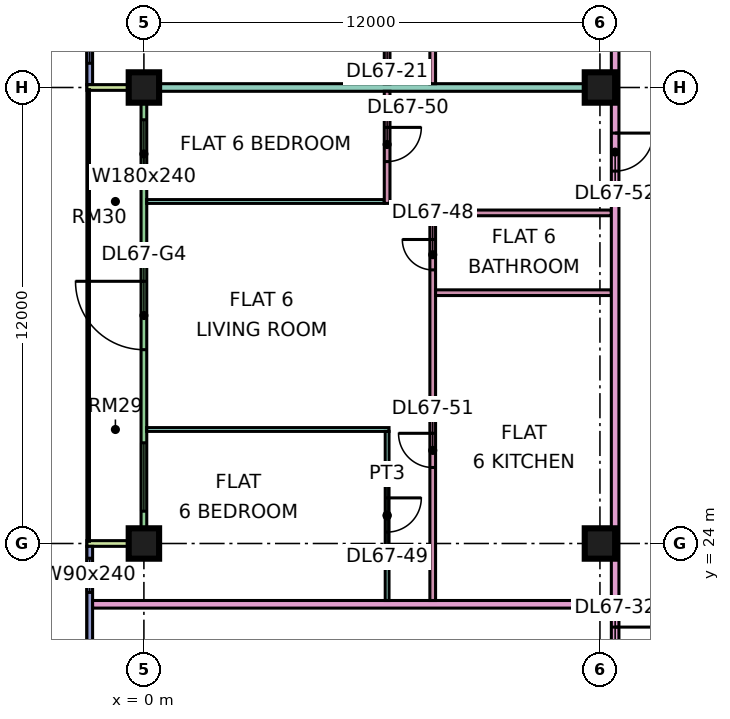
"""IFC4 building model, lengths in metres.
Left out: names, types, materials, properties, quantities, classifications, styles, units other than length and angle.
Written with IfcOpenShell. Run it as: python <this file> out.ifc"""

import sys

from ifc_helpers import new_model, si_unit, direction, frame, frame_2d, origin, origin_2d, place, context, subcontext, project, spatial, rectangle, extrude, element, fill, save


model = new_model("IFC4")
c1 = context("Model", 3, precision=1e-05, world=origin(), true_north=direction((0.0, 1.0)))
c2 = subcontext(c1, "Body", "Model", "MODEL_VIEW")
j1 = project(units=[si_unit("LENGTHUNIT", "METRE"), si_unit("PLANEANGLEUNIT", "RADIAN")], contexts=[c1])
p1 = place(None, origin())
s1 = spatial("IfcSite", under=j1, at=p1, CompositionType="ELEMENT")
p2 = place(p1, origin())
s2 = spatial("IfcBuilding", under=s1, at=p2, CompositionType="ELEMENT")
p3 = place(p2, frame((0.0, 0.0, 288.4)))
s3 = spatial("IfcBuildingStorey", under=s2, at=p3, CompositionType="ELEMENT", Elevation=288.4)
p4 = place(p3, frame((0.0, 24.0, 0.0), z_axis=(0.0, 0.0, 1.0), x_axis=(1.0, 0.0, 0.0)))
e1 = element("IfcColumn", 1, at=p4, inside=s3, PredefinedType="COLUMN", context=c2, shape_type="SweptSolid", body=[
    extrude(rectangle(XDim=0.8, YDim=0.8, at=origin_2d()), origin(), (0.0, 0.0, 1.0), 3.75),
])
p5 = place(p3, frame((0.0, 36.0, 0.0), z_axis=(0.0, 0.0, 1.0), x_axis=(1.0, 0.0, 0.0)))
e2 = element("IfcColumn", 2, at=p5, inside=s3, PredefinedType="COLUMN", context=c2, shape_type="SweptSolid", body=[
    extrude(rectangle(XDim=0.8, YDim=0.8, at=origin_2d()), origin(), (0.0, 0.0, 1.0), 3.75),
])
for number, where, z_axis, x_axis in (
    (3, (12.0, 24.0, 0.0), (0.0, 0.0, 1.0), (1.0, 0.0, 0.0)),
    (4, (12.0, 36.0, 0.0), (0.0, 0.0, 1.0), (1.0, 0.0, 0.0)),
):
    element("IfcColumn", number, at=place(p3, frame(where, z_axis=z_axis, x_axis=x_axis)), inside=s3, PredefinedType="COLUMN", context=c2, shape_type="SweptSolid", body=[
        extrude(rectangle(XDim=0.8, YDim=0.8, at=origin_2d()), origin(), (0.0, 0.0, 1.0), 3.75),
    ])
p6 = place(p3, frame((-1.425, 47.925, 0.0), z_axis=(0.0, 0.0, 1.0), x_axis=(0.0, -1.0, 0.0)))
e5 = element("IfcWall", 5, at=p6, inside=s3, PredefinedType="SOLIDWALL", context=c2, shape_type="SweptSolid", body=[
    extrude(rectangle(XDim=11.85, YDim=0.15, at=frame_2d((5.925, 0.0))), origin(), (0.0, 0.0, 1.0), 3.35),
])
p7 = place(p6, frame((1.462, 0.0, 0.45)))
e6 = element("IfcOpeningElement", 6, at=p7, cuts=e5, PredefinedType="OPENING", context=c2, shape_type="SweptSolid", body=[
    extrude(rectangle(XDim=3.0, YDim=2.4, at=frame_2d((1.5, 1.2))), frame((0.0, 0.085, 0.0), z_axis=(0.0, -1.0, 0.0), x_axis=(1.0, 0.0, 0.0)), (0.0, 0.0, 1.0), 0.17),
])
p8 = place(p6, frame((6.525, 0.0, 0.45)))
e7 = element("IfcOpeningElement", 7, at=p8, cuts=e5, PredefinedType="OPENING", context=c2, shape_type="SweptSolid", body=[
    extrude(rectangle(XDim=1.8, YDim=2.4, at=frame_2d((0.9, 1.2))), frame((0.0, 0.085, 0.0), z_axis=(0.0, -1.0, 0.0), x_axis=(1.0, 0.0, 0.0)), (0.0, 0.0, 1.0), 0.17),
])
p9 = place(p6, frame((9.488, 0.0, 0.45)))
e8 = element("IfcOpeningElement", 8, at=p9, cuts=e5, PredefinedType="OPENING", context=c2, shape_type="SweptSolid", body=[
    extrude(rectangle(XDim=1.8, YDim=2.4, at=frame_2d((0.9, 1.2))), frame((0.0, 0.085, 0.0), z_axis=(0.0, -1.0, 0.0), x_axis=(1.0, 0.0, 0.0)), (0.0, 0.0, 1.0), 0.17),
])
p10 = place(p3, frame((0.0, 35.925, 0.0), z_axis=(0.0, 0.0, 1.0), x_axis=(0.0, -1.0, 0.0)))
e9 = element("IfcWall", 9, at=p10, inside=s3, PredefinedType="SOLIDWALL", context=c2, shape_type="SweptSolid", body=[
    extrude(rectangle(XDim=11.85, YDim=0.15, at=frame_2d((5.925, 0.0))), origin(), (0.0, 0.0, 1.0), 3.35),
])
p11 = place(p10, frame((0.775, 0.0, 0.45)))
e10 = element("IfcOpeningElement", 10, at=p11, cuts=e9, PredefinedType="OPENING", context=c2, shape_type="SweptSolid", body=[
    extrude(rectangle(XDim=1.8, YDim=2.4, at=frame_2d((0.9, 1.2))), frame((0.0, 0.085, 0.0), z_axis=(0.0, -1.0, 0.0), x_axis=(1.0, 0.0, 0.0)), (0.0, 0.0, 1.0), 0.17),
])
p12 = place(p10, frame((5.025, 0.0, 0.0)))
e11 = element("IfcOpeningElement", 11, at=p12, cuts=e9, PredefinedType="OPENING", context=c2, shape_type="SweptSolid", body=[
    extrude(rectangle(XDim=1.8, YDim=2.4, at=frame_2d((0.9, 1.2))), frame((0.0, 0.085, 0.0), z_axis=(0.0, -1.0, 0.0), x_axis=(1.0, 0.0, 0.0)), (0.0, 0.0, 1.0), 0.17),
])
p13 = place(p10, frame((9.275, 0.0, 0.45)))
e12 = element("IfcOpeningElement", 12, at=p13, cuts=e9, PredefinedType="OPENING", context=c2, shape_type="SweptSolid", body=[
    extrude(rectangle(XDim=1.8, YDim=2.4, at=frame_2d((0.9, 1.2))), frame((0.0, 0.085, 0.0), z_axis=(0.0, -1.0, 0.0), x_axis=(1.0, 0.0, 0.0)), (0.0, 0.0, 1.0), 0.17),
])
for number, where, z_axis, x_axis in (
    (13, (-1.5, 36.0, 0.0), (0.0, 0.0, 1.0), (1.0, 0.0, 0.0)),
    (14, (-1.5, 24.0, 0.0), (0.0, 0.0, 1.0), (1.0, 0.0, 0.0)),
):
    element("IfcWall", number, at=place(p3, frame(where, z_axis=z_axis, x_axis=x_axis)), inside=s3, PredefinedType="SOLIDWALL", context=c2, shape_type="SweptSolid", body=[
        extrude(rectangle(XDim=1.5, YDim=0.15, at=frame_2d((0.75, 0.0))), origin(), (0.0, 0.0, 1.0), 3.35),
    ])
p14 = place(p3, frame((-1.425, 23.925, 0.0), z_axis=(0.0, 0.0, 1.0), x_axis=(0.0, -1.0, 0.0)))
e15 = element("IfcWall", 15, at=p14, inside=s3, PredefinedType="SOLIDWALL", context=c2, shape_type="SweptSolid", body=[
    extrude(rectangle(XDim=11.425, YDim=0.15, at=frame_2d((5.712, 0.0))), origin(), (0.0, 0.0, 1.0), 3.35),
])
p15 = place(p14, frame((0.312, 0.0, 0.45)))
e16 = element("IfcOpeningElement", 16, at=p15, cuts=e15, PredefinedType="OPENING", context=c2, shape_type="SweptSolid", body=[
    extrude(rectangle(XDim=0.9, YDim=2.4, at=frame_2d((0.45, 1.2))), frame((0.0, 0.085, 0.0), z_axis=(0.0, -1.0, 0.0), x_axis=(1.0, 0.0, 0.0)), (0.0, 0.0, 1.0), 0.17),
])
p16 = place(p14, frame((6.175, 0.0, 0.45)))
e17 = element("IfcOpeningElement", 17, at=p16, cuts=e15, PredefinedType="OPENING", context=c2, shape_type="SweptSolid", body=[
    extrude(rectangle(XDim=3.0, YDim=2.4, at=frame_2d((1.5, 1.2))), frame((0.0, 0.085, 0.0), z_axis=(0.0, -1.0, 0.0), x_axis=(1.0, 0.0, 0.0)), (0.0, 0.0, 1.0), 0.17),
])
p17 = place(p3, frame((-1.35, 22.4, 0.0), z_axis=(0.0, 0.0, 1.0), x_axis=(1.0, 0.0, 0.0)))
e18 = element("IfcWall", 18, at=p17, inside=s3, PredefinedType="PARTITIONING", context=c2, shape_type="SweptSolid", body=[
    extrude(rectangle(XDim=13.65, YDim=0.2, at=frame_2d((6.825, 0.0))), origin(), (0.0, 0.0, 1.0), 3.35),
])
e19 = element("IfcWall", 19, at=p5, inside=s3, PredefinedType="PARTITIONING", context=c2, shape_type="SweptSolid", body=[
    extrude(rectangle(XDim=12.3, YDim=0.2, at=frame_2d((6.15, 0.0))), origin(), (0.0, 0.0, 1.0), 3.35),
])
p18 = place(p3, frame((0.074, 27.0, 0.0), z_axis=(0.0, 0.0, 1.0), x_axis=(1.0, 0.0, 0.0)))
e20 = element("IfcWall", 20, at=p18, inside=s3, PredefinedType="PARTITIONING", context=c2, shape_type="SweptSolid", body=[
    extrude(rectangle(XDim=6.376, YDim=0.1, at=frame_2d((3.188, 0.0))), origin(), (0.0, 0.0, 1.0), 3.35),
])
p19 = place(p3, frame((0.074, 33.0, 0.0), z_axis=(0.0, 0.0, 1.0), x_axis=(1.0, 0.0, 0.0)))
e21 = element("IfcWall", 21, at=p19, inside=s3, PredefinedType="PARTITIONING", context=c2, shape_type="SweptSolid", body=[
    extrude(rectangle(XDim=6.251, YDim=0.1, at=frame_2d((3.125, 0.0))), origin(), (0.0, 0.0, 1.0), 3.35),
])
p20 = place(p3, frame((6.4, 22.5, 0.0), z_axis=(0.0, 0.0, 1.0), x_axis=(0.0, 1.0, 0.0)))
e22 = element("IfcWall", 22, at=p20, inside=s3, PredefinedType="PARTITIONING", context=c2, shape_type="SweptSolid", body=[
    extrude(rectangle(XDim=4.45, YDim=0.1, at=frame_2d((2.225, 0.0))), origin(), (0.0, 0.0, 1.0), 3.35),
])
p21 = place(p20, frame((1.8, 0.0, 0.0)))
e23 = element("IfcOpeningElement", 23, at=p21, cuts=e22, PredefinedType="OPENING", context=c2, shape_type="SweptSolid", body=[
    extrude(rectangle(XDim=0.9, YDim=2.1, at=frame_2d((0.45, 1.05))), frame((0.0, 0.06, 0.0), z_axis=(0.0, -1.0, 0.0), x_axis=(1.0, 0.0, 0.0)), (0.0, 0.0, 1.0), 0.12),
])
p22 = place(p3, frame((6.4, 32.95, 0.0), z_axis=(0.0, 0.0, 1.0), x_axis=(0.0, 1.0, 0.0)))
e24 = element("IfcWall", 24, at=p22, inside=s3, PredefinedType="PARTITIONING", context=c2, shape_type="SweptSolid", body=[
    extrude(rectangle(XDim=2.95, YDim=0.15, at=frame_2d((1.475, 0.0))), origin(), (0.0, 0.0, 1.0), 3.35),
])
p23 = place(p22, frame((1.1, 0.0, 0.0)))
e25 = element("IfcOpeningElement", 25, at=p23, cuts=e24, PredefinedType="OPENING", context=c2, shape_type="SweptSolid", body=[
    extrude(rectangle(XDim=0.9, YDim=2.1, at=frame_2d((0.45, 1.05))), frame((0.0, 0.085, 0.0), z_axis=(0.0, -1.0, 0.0), x_axis=(1.0, 0.0, 0.0)), (0.0, 0.0, 1.0), 0.17),
])
p24 = place(p3, frame((6.4, 36.1, 0.0), z_axis=(0.0, 0.0, 1.0), x_axis=(0.0, 1.0, 0.0)))
e26 = element("IfcWall", 26, at=p24, inside=s3, PredefinedType="PARTITIONING", context=c2, shape_type="SweptSolid", body=[
    extrude(rectangle(XDim=11.95, YDim=0.15, at=frame_2d((5.975, 0.0))), origin(), (0.0, 0.0, 1.0), 3.35),
])
p25 = place(p24, frame((0.95, 0.0, 0.0)))
e27 = element("IfcOpeningElement", 27, at=p25, cuts=e26, PredefinedType="OPENING", context=c2, shape_type="SweptSolid", body=[
    extrude(rectangle(XDim=0.9, YDim=2.1, at=frame_2d((0.45, 1.05))), frame((0.0, 0.085, 0.0), z_axis=(0.0, -1.0, 0.0), x_axis=(1.0, 0.0, 0.0)), (0.0, 0.0, 1.0), 0.17),
])
p26 = place(p24, frame((4.8, 0.0, 0.0)))
e28 = element("IfcOpeningElement", 28, at=p26, cuts=e26, PredefinedType="OPENING", context=c2, shape_type="SweptSolid", body=[
    extrude(rectangle(XDim=0.8, YDim=2.1, at=frame_2d((0.4, 1.05))), frame((0.0, 0.085, 0.0), z_axis=(0.0, -1.0, 0.0), x_axis=(1.0, 0.0, 0.0)), (0.0, 0.0, 1.0), 0.17),
])
p27 = place(p3, frame((7.6, 22.5, 0.0), z_axis=(0.0, 0.0, 1.0), x_axis=(0.0, 1.0, 0.0)))
e29 = element("IfcWall", 29, at=p27, inside=s3, PredefinedType="PARTITIONING", context=c2, shape_type="SweptSolid", body=[
    extrude(rectangle(XDim=10.275, YDim=0.15, at=frame_2d((5.137, 0.0))), origin(), (0.0, 0.0, 1.0), 3.35),
])
p28 = place(p27, frame((8.7, 0.0, 0.0)))
e30 = element("IfcOpeningElement", 30, at=p28, cuts=e29, PredefinedType="OPENING", context=c2, shape_type="SweptSolid", body=[
    extrude(rectangle(XDim=0.8, YDim=2.1, at=frame_2d((0.4, 1.05))), frame((0.0, 0.085, 0.0), z_axis=(0.0, -1.0, 0.0), x_axis=(1.0, 0.0, 0.0)), (0.0, 0.0, 1.0), 0.17),
])
p29 = place(p27, frame((3.5, 0.0, 0.0)))
e31 = element("IfcOpeningElement", 31, at=p29, cuts=e29, PredefinedType="OPENING", context=c2, shape_type="SweptSolid", body=[
    extrude(rectangle(XDim=0.9, YDim=2.1, at=frame_2d((0.45, 1.05))), frame((0.0, 0.085, 0.0), z_axis=(0.0, -1.0, 0.0), x_axis=(1.0, 0.0, 0.0)), (0.0, 0.0, 1.0), 0.17),
])
p30 = place(p3, frame((7.6, 36.1, 0.0), z_axis=(0.0, 0.0, 1.0), x_axis=(0.0, 1.0, 0.0)))
e32 = element("IfcWall", 32, at=p30, inside=s3, PredefinedType="PARTITIONING", context=c2, shape_type="SweptSolid", body=[
    extrude(rectangle(XDim=14.975, YDim=0.15, at=frame_2d((7.487, 0.0))), origin(), (0.0, 0.0, 1.0), 3.35),
])
p31 = place(p30, frame((9.5, 0.0, 0.0)))
e33 = element("IfcOpeningElement", 33, at=p31, cuts=e32, PredefinedType="OPENING", context=c2, shape_type="SweptSolid", body=[
    extrude(rectangle(XDim=0.8, YDim=2.1, at=frame_2d((0.4, 1.05))), frame((0.0, 0.085, 0.0), z_axis=(0.0, -1.0, 0.0), x_axis=(1.0, 0.0, 0.0)), (0.0, 0.0, 1.0), 0.17),
])
p32 = place(p30, frame((2.75, 0.0, 0.0)))
e34 = element("IfcOpeningElement", 34, at=p32, cuts=e32, PredefinedType="OPENING", context=c2, shape_type="SweptSolid", body=[
    extrude(rectangle(XDim=0.9, YDim=2.1, at=frame_2d((0.45, 1.05))), frame((0.0, 0.085, 0.0), z_axis=(0.0, -1.0, 0.0), x_axis=(1.0, 0.0, 0.0)), (0.0, 0.0, 1.0), 0.17),
])
p33 = place(p30, frame((7.1, 0.0, 0.0)))
e35 = element("IfcOpeningElement", 35, at=p33, cuts=e32, PredefinedType="OPENING", context=c2, shape_type="SweptSolid", body=[
    extrude(rectangle(XDim=0.9, YDim=2.1, at=frame_2d((0.45, 1.05))), frame((0.0, 0.085, 0.0), z_axis=(0.0, -1.0, 0.0), x_axis=(1.0, 0.0, 0.0)), (0.0, 0.0, 1.0), 0.17),
])
for number, where, z_axis, x_axis in (
    (36, (7.675, 30.6, 0.0), (0.0, 0.0, 1.0), (1.0, 0.0, 0.0)),
    (37, (7.675, 32.7, 0.0), (0.0, 0.0, 1.0), (1.0, 0.0, 0.0)),
):
    element("IfcWall", number, at=place(p3, frame(where, z_axis=z_axis, x_axis=x_axis)), inside=s3, PredefinedType="PARTITIONING", context=c2, shape_type="SweptSolid", body=[
        extrude(rectangle(XDim=4.625, YDim=0.15, at=frame_2d((2.312, 0.0))), origin(), (0.0, 0.0, 1.0), 3.35),
    ])
p34 = place(p3, frame((12.4, 20.0, 0.0), z_axis=(0.0, 0.0, 1.0), x_axis=(0.0, 1.0, 0.0)))
e38 = element("IfcWall", 38, at=p34, inside=s3, PredefinedType="PARTITIONING", context=c2, shape_type="SweptSolid", body=[
    extrude(rectangle(XDim=34.0, YDim=0.2, at=frame_2d((17.0, 0.0))), origin(), (0.0, 0.0, 1.0), 3.35),
])
p35 = place(p34, frame((31.95, 0.0, 0.0)))
e39 = element("IfcOpeningElement", 39, at=p35, cuts=e38, PredefinedType="OPENING", context=c2, shape_type="SweptSolid", body=[
    extrude(rectangle(XDim=1.0, YDim=2.1, at=frame_2d((0.5, 1.05))), frame((0.0, 0.11, 0.0), z_axis=(0.0, -1.0, 0.0), x_axis=(1.0, 0.0, 0.0)), (0.0, 0.0, 1.0), 0.22),
])
p36 = place(p34, frame((0.6, 0.0, 0.0)))
e40 = element("IfcOpeningElement", 40, at=p36, cuts=e38, PredefinedType="OPENING", context=c2, shape_type="SweptSolid", body=[
    extrude(rectangle(XDim=1.2, YDim=2.1, at=frame_2d((0.6, 1.05))), frame((0.0, 0.11, 0.0), z_axis=(0.0, -1.0, 0.0), x_axis=(1.0, 0.0, 0.0)), (0.0, 0.0, 1.0), 0.22),
])
p37 = place(p34, frame((13.8, 0.0, 0.0)))
e41 = element("IfcOpeningElement", 41, at=p37, cuts=e38, PredefinedType="OPENING", context=c2, shape_type="SweptSolid", body=[
    extrude(rectangle(XDim=1.0, YDim=2.1, at=frame_2d((0.5, 1.05))), frame((0.0, 0.11, 0.0), z_axis=(0.0, -1.0, 0.0), x_axis=(1.0, 0.0, 0.0)), (0.0, 0.0, 1.0), 0.22),
])
p38 = place(p9, origin())
e42 = element("IfcWindow", 42, at=p38, inside=s3, PartitioningType="SINGLE_PANEL", PredefinedType="WINDOW", context=c2, shape_type="SweptSolid", body=[
    extrude(rectangle(XDim=1.8, YDim=2.4, at=frame_2d((0.9, 1.2))), frame((0.0, 0.03, 0.0), z_axis=(0.0, -1.0, 0.0), x_axis=(1.0, 0.0, 0.0)), (0.0, 0.0, 1.0), 0.06),
])
fill(e8, e42)
p39 = place(p11, origin())
e43 = element("IfcWindow", 43, at=p39, inside=s3, PartitioningType="SINGLE_PANEL", PredefinedType="WINDOW", context=c2, shape_type="SweptSolid", body=[
    extrude(rectangle(XDim=1.8, YDim=2.4, at=frame_2d((0.9, 1.2))), frame((0.0, 0.03, 0.0), z_axis=(0.0, -1.0, 0.0), x_axis=(1.0, 0.0, 0.0)), (0.0, 0.0, 1.0), 0.06),
])
fill(e10, e43)
p40 = place(p12, frame((1.8, 0.0, 0.0), z_axis=(0.0, 0.0, 1.0), x_axis=(-1.0, 0.0, 0.0)))
e44 = element("IfcDoor", 44, at=p40, inside=s3, OperationType="DOUBLE_DOOR_SINGLE_SWING", PredefinedType="DOOR", context=c2, shape_type="SweptSolid", body=[
    extrude(rectangle(XDim=1.8, YDim=2.4, at=frame_2d((0.9, 1.2))), frame((0.0, 0.025, 0.0), z_axis=(0.0, -1.0, 0.0), x_axis=(1.0, 0.0, 0.0)), (0.0, 0.0, 1.0), 0.05),
])
fill(e11, e44)
p41 = place(p13, origin())
e45 = element("IfcWindow", 45, at=p41, inside=s3, PartitioningType="SINGLE_PANEL", PredefinedType="WINDOW", context=c2, shape_type="SweptSolid", body=[
    extrude(rectangle(XDim=1.8, YDim=2.4, at=frame_2d((0.9, 1.2))), frame((0.0, 0.03, 0.0), z_axis=(0.0, -1.0, 0.0), x_axis=(1.0, 0.0, 0.0)), (0.0, 0.0, 1.0), 0.06),
])
fill(e12, e45)
p42 = place(p15, origin())
e46 = element("IfcWindow", 46, at=p42, inside=s3, PartitioningType="SINGLE_PANEL", PredefinedType="WINDOW", context=c2, shape_type="SweptSolid", body=[
    extrude(rectangle(XDim=0.9, YDim=2.4, at=frame_2d((0.45, 1.2))), frame((0.0, 0.03, 0.0), z_axis=(0.0, -1.0, 0.0), x_axis=(1.0, 0.0, 0.0)), (0.0, 0.0, 1.0), 0.06),
])
fill(e16, e46)
p43 = place(p36, origin())
e47 = element("IfcDoor", 47, at=p43, inside=s3, OperationType="SINGLE_SWING_RIGHT", PredefinedType="DOOR", context=c2, shape_type="SweptSolid", body=[
    extrude(rectangle(XDim=1.2, YDim=2.1, at=frame_2d((0.6, 1.05))), frame((0.0, 0.025, 0.0), z_axis=(0.0, -1.0, 0.0), x_axis=(1.0, 0.0, 0.0)), (0.0, 0.0, 1.0), 0.05),
])
fill(e40, e47)
p44 = place(p28, frame((0.8, 0.0, 0.0), z_axis=(0.0, 0.0, 1.0), x_axis=(-1.0, 0.0, 0.0)))
e48 = element("IfcDoor", 48, at=p44, inside=s3, OperationType="SINGLE_SWING_RIGHT", PredefinedType="DOOR", context=c2, shape_type="SweptSolid", body=[
    extrude(rectangle(XDim=0.8, YDim=2.1, at=frame_2d((0.4, 1.05))), frame((0.0, 0.025, 0.0), z_axis=(0.0, -1.0, 0.0), x_axis=(1.0, 0.0, 0.0)), (0.0, 0.0, 1.0), 0.05),
])
fill(e30, e48)
p45 = place(p21, origin())
e49 = element("IfcDoor", 49, at=p45, inside=s3, OperationType="SINGLE_SWING_RIGHT", PredefinedType="DOOR", context=c2, shape_type="SweptSolid", body=[
    extrude(rectangle(XDim=0.9, YDim=2.1, at=frame_2d((0.45, 1.05))), frame((0.0, 0.025, 0.0), z_axis=(0.0, -1.0, 0.0), x_axis=(1.0, 0.0, 0.0)), (0.0, 0.0, 1.0), 0.05),
])
fill(e23, e49)
p46 = place(p23, origin())
e50 = element("IfcDoor", 50, at=p46, inside=s3, OperationType="SINGLE_SWING_RIGHT", PredefinedType="DOOR", context=c2, shape_type="SweptSolid", body=[
    extrude(rectangle(XDim=0.9, YDim=2.1, at=frame_2d((0.45, 1.05))), frame((0.0, 0.025, 0.0), z_axis=(0.0, -1.0, 0.0), x_axis=(1.0, 0.0, 0.0)), (0.0, 0.0, 1.0), 0.05),
])
fill(e25, e50)
p47 = place(p29, frame((0.9, 0.0, 0.0), z_axis=(0.0, 0.0, 1.0), x_axis=(-1.0, 0.0, 0.0)))
e51 = element("IfcDoor", 51, at=p47, inside=s3, OperationType="SINGLE_SWING_RIGHT", PredefinedType="DOOR", context=c2, shape_type="SweptSolid", body=[
    extrude(rectangle(XDim=0.9, YDim=2.1, at=frame_2d((0.45, 1.05))), frame((0.0, 0.025, 0.0), z_axis=(0.0, -1.0, 0.0), x_axis=(1.0, 0.0, 0.0)), (0.0, 0.0, 1.0), 0.05),
])
fill(e31, e51)
p48 = place(p37, origin())
e52 = element("IfcDoor", 52, at=p48, inside=s3, OperationType="SINGLE_SWING_RIGHT", PredefinedType="DOOR", context=c2, shape_type="SweptSolid", body=[
    extrude(rectangle(XDim=1.0, YDim=2.1, at=frame_2d((0.5, 1.05))), frame((0.0, 0.025, 0.0), z_axis=(0.0, -1.0, 0.0), x_axis=(1.0, 0.0, 0.0)), (0.0, 0.0, 1.0), 0.05),
])
fill(e41, e52)
save(model, sys.argv[1])
